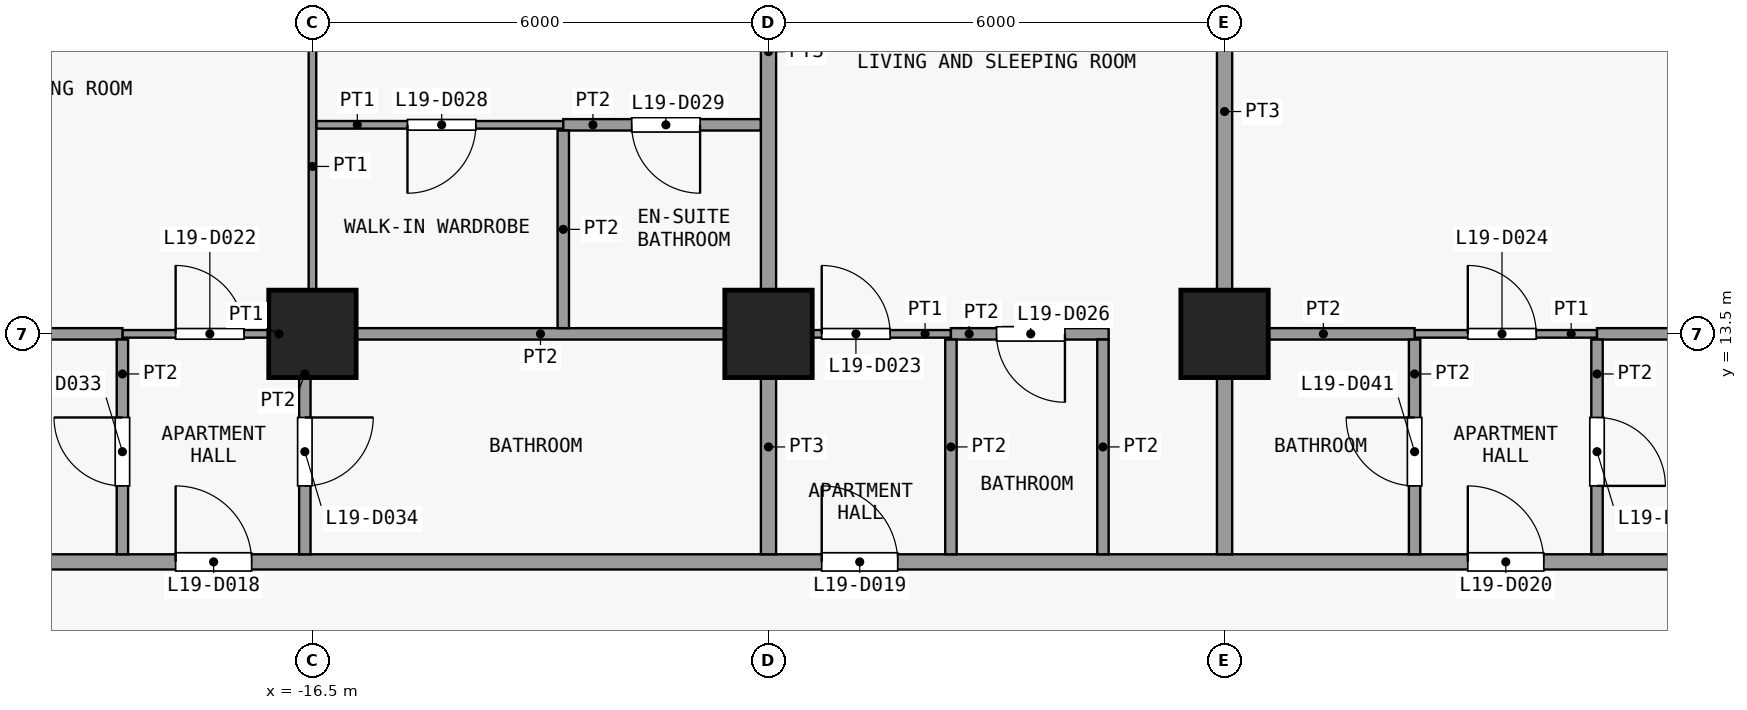
"""IFC4 building model, lengths in metres.
Left out: names, types, materials, properties, quantities, classifications, styles, units other than length and angle.
Written with IfcOpenShell. Run it as: python <this file> out.ifc"""

import sys

from ifc_helpers import new_model, si_unit, direction, frame, frame_2d, origin, origin_2d, place, context, subcontext, project, spatial, rectangle, extrude, element, fill, save


model = new_model("IFC4")
c1 = context("Model", 3, precision=1e-05, world=origin(), true_north=direction((0.0, 1.0)))
c2 = subcontext(c1, "Body", "Model", "MODEL_VIEW")
j1 = project(units=[si_unit("LENGTHUNIT", "METRE"), si_unit("PLANEANGLEUNIT", "RADIAN")], contexts=[c1])
p1 = place(None, origin())
s1 = spatial("IfcSite", under=j1, at=p1, CompositionType="ELEMENT")
p2 = place(p1, origin())
s2 = spatial("IfcBuilding", under=s1, at=p2, CompositionType="ELEMENT")
p3 = place(p2, frame((0.0, 0.0, 81.1)))
s3 = spatial("IfcBuildingStorey", under=s2, at=p3, CompositionType="ELEMENT", Elevation=81.1)
for number, where, z_axis, x_axis in (
    (1, (-16.5, 13.5, 0.0), (0.0, 0.0, 1.0), (1.0, 0.0, 0.0)),
    (2, (-10.5, 13.5, 0.0), (0.0, 0.0, 1.0), (1.0, 0.0, 0.0)),
    (3, (-4.5, 13.5, 0.0), (0.0, 0.0, 1.0), (1.0, 0.0, 0.0)),
):
    element("IfcColumn", number, at=place(p3, frame(where, z_axis=z_axis, x_axis=x_axis)), inside=s3, PredefinedType="COLUMN", context=c2, shape_type="SweptSolid", body=[
        extrude(rectangle(XDim=1.15, YDim=1.15, at=origin_2d()), origin(), (0.0, 0.0, 1.0), 3.6),
    ])
p4 = place(p3, frame((-23.85, 10.5, 0.0), z_axis=(0.0, 0.0, 1.0), x_axis=(1.0, 0.0, 0.0)))
e4 = element("IfcWall", 4, at=p4, inside=s3, PredefinedType="PARTITIONING", context=c2, shape_type="SweptSolid", body=[
    extrude(rectangle(XDim=49.2, YDim=0.2, at=frame_2d((24.6, 0.0))), origin(), (0.0, 0.0, 1.0), 3.3),
])
p5 = place(p4, frame((5.55, 0.0, 0.0)))
e5 = element("IfcOpeningElement", 5, at=p5, cuts=e4, PredefinedType="OPENING", context=c2, shape_type="SweptSolid", body=[
    extrude(rectangle(XDim=1.0, YDim=2.1, at=frame_2d((0.5, 1.05))), frame((0.0, 0.11, 0.0), z_axis=(0.0, -1.0, 0.0), x_axis=(1.0, 0.0, 0.0)), (0.0, 0.0, 1.0), 0.22),
])
p6 = place(p4, frame((14.05, 0.0, 0.0)))
e6 = element("IfcOpeningElement", 6, at=p6, cuts=e4, PredefinedType="OPENING", context=c2, shape_type="SweptSolid", body=[
    extrude(rectangle(XDim=1.0, YDim=2.1, at=frame_2d((0.5, 1.05))), frame((0.0, 0.11, 0.0), z_axis=(0.0, -1.0, 0.0), x_axis=(1.0, 0.0, 0.0)), (0.0, 0.0, 1.0), 0.22),
])
p7 = place(p4, frame((22.55, 0.0, 0.0)))
e7 = element("IfcOpeningElement", 7, at=p7, cuts=e4, PredefinedType="OPENING", context=c2, shape_type="SweptSolid", body=[
    extrude(rectangle(XDim=1.0, YDim=2.1, at=frame_2d((0.5, 1.05))), frame((0.0, 0.11, 0.0), z_axis=(0.0, -1.0, 0.0), x_axis=(1.0, 0.0, 0.0)), (0.0, 0.0, 1.0), 0.22),
])
p8 = place(p4, frame((43.55, 0.0, 0.0)))
e8 = element("IfcOpeningElement", 8, at=p8, cuts=e4, PredefinedType="OPENING", context=c2, shape_type="SweptSolid", body=[
    extrude(rectangle(XDim=1.0, YDim=2.1, at=frame_2d((0.5, 1.05))), frame((0.0, 0.11, 0.0), z_axis=(0.0, -1.0, 0.0), x_axis=(1.0, 0.0, 0.0)), (0.0, 0.0, 1.0), 0.22),
])
p9 = place(p3, frame((-19.0, 13.5, 0.0), z_axis=(0.0, 0.0, 1.0), x_axis=(1.0, 0.0, 0.0)))
e9 = element("IfcWall", 9, at=p9, inside=s3, PredefinedType="PARTITIONING", context=c2, shape_type="SweptSolid", body=[
    extrude(rectangle(XDim=2.4, YDim=0.1, at=frame_2d((1.2, 0.0))), origin(), (0.0, 0.0, 1.0), 3.3),
])
p10 = place(p9, frame((0.7, 0.0, 0.0)))
e10 = element("IfcOpeningElement", 10, at=p10, cuts=e9, PredefinedType="OPENING", context=c2, shape_type="SweptSolid", body=[
    extrude(rectangle(XDim=0.9, YDim=2.1, at=frame_2d((0.45, 1.05))), frame((0.0, 0.06, 0.0), z_axis=(0.0, -1.0, 0.0), x_axis=(1.0, 0.0, 0.0)), (0.0, 0.0, 1.0), 0.12),
])
p11 = place(p3, frame((-10.5, 13.5, 0.0), z_axis=(0.0, 0.0, 1.0), x_axis=(1.0, 0.0, 0.0)))
e11 = element("IfcWall", 11, at=p11, inside=s3, PredefinedType="PARTITIONING", context=c2, shape_type="SweptSolid", body=[
    extrude(rectangle(XDim=2.4, YDim=0.1, at=frame_2d((1.2, 0.0))), origin(), (0.0, 0.0, 1.0), 3.3),
])
p12 = place(p11, frame((0.7, 0.0, 0.0)))
e12 = element("IfcOpeningElement", 12, at=p12, cuts=e11, PredefinedType="OPENING", context=c2, shape_type="SweptSolid", body=[
    extrude(rectangle(XDim=0.9, YDim=2.1, at=frame_2d((0.45, 1.05))), frame((0.0, 0.06, 0.0), z_axis=(0.0, -1.0, 0.0), x_axis=(1.0, 0.0, 0.0)), (0.0, 0.0, 1.0), 0.12),
])
p13 = place(p3, frame((-2.0, 13.5, 0.0), z_axis=(0.0, 0.0, 1.0), x_axis=(1.0, 0.0, 0.0)))
e13 = element("IfcWall", 13, at=p13, inside=s3, PredefinedType="PARTITIONING", context=c2, shape_type="SweptSolid", body=[
    extrude(rectangle(XDim=2.4, YDim=0.1, at=frame_2d((1.2, 0.0))), origin(), (0.0, 0.0, 1.0), 3.3),
])
p14 = place(p13, frame((0.7, 0.0, 0.0)))
e14 = element("IfcOpeningElement", 14, at=p14, cuts=e13, PredefinedType="OPENING", context=c2, shape_type="SweptSolid", body=[
    extrude(rectangle(XDim=0.9, YDim=2.1, at=frame_2d((0.45, 1.05))), frame((0.0, 0.06, 0.0), z_axis=(0.0, -1.0, 0.0), x_axis=(1.0, 0.0, 0.0)), (0.0, 0.0, 1.0), 0.12),
])
p15 = place(p3, frame((-23.85, 13.5, 0.0), z_axis=(0.0, 0.0, 1.0), x_axis=(1.0, 0.0, 0.0)))
e15 = element("IfcWall", 15, at=p15, inside=s3, PredefinedType="PARTITIONING", context=c2, shape_type="SweptSolid", body=[
    extrude(rectangle(XDim=4.85, YDim=0.15, at=frame_2d((2.425, 0.0))), origin(), (0.0, 0.0, 1.0), 3.3),
])
p16 = place(p3, frame((-16.5, 13.5, 0.0), z_axis=(0.0, 0.0, 1.0), x_axis=(1.0, 0.0, 0.0)))
e16 = element("IfcWall", 16, at=p16, inside=s3, PredefinedType="PARTITIONING", context=c2, shape_type="SweptSolid", body=[
    extrude(rectangle(XDim=6.0, YDim=0.15, at=frame_2d((3.0, 0.0))), origin(), (0.0, 0.0, 1.0), 3.3),
])
p17 = place(p3, frame((-8.1, 13.5, 0.0), z_axis=(0.0, 0.0, 1.0), x_axis=(1.0, 0.0, 0.0)))
e17 = element("IfcWall", 17, at=p17, inside=s3, PredefinedType="PARTITIONING", context=c2, shape_type="SweptSolid", body=[
    extrude(rectangle(XDim=2.075, YDim=0.15, at=frame_2d((1.038, 0.0))), origin(), (0.0, 0.0, 1.0), 3.3),
])
p18 = place(p17, frame((0.6, 0.0, 0.0)))
e18 = element("IfcOpeningElement", 18, at=p18, cuts=e17, PredefinedType="OPENING", context=c2, shape_type="SweptSolid", body=[
    extrude(rectangle(XDim=0.9, YDim=2.1, at=frame_2d((0.45, 1.05))), frame((0.0, 0.085, 0.0), z_axis=(0.0, -1.0, 0.0), x_axis=(1.0, 0.0, 0.0)), (0.0, 0.0, 1.0), 0.17),
])
p19 = place(p3, frame((-4.4, 13.5, 0.0), z_axis=(0.0, 0.0, 1.0), x_axis=(1.0, 0.0, 0.0)))
e19 = element("IfcWall", 19, at=p19, inside=s3, PredefinedType="PARTITIONING", context=c2, shape_type="SweptSolid", body=[
    extrude(rectangle(XDim=2.4, YDim=0.15, at=frame_2d((1.2, 0.0))), origin(), (0.0, 0.0, 1.0), 3.3),
])
p20 = place(p3, frame((0.4, 13.5, 0.0), z_axis=(0.0, 0.0, 1.0), x_axis=(1.0, 0.0, 0.0)))
e20 = element("IfcWall", 20, at=p20, inside=s3, PredefinedType="PARTITIONING", context=c2, shape_type="SweptSolid", body=[
    extrude(rectangle(XDim=10.1, YDim=0.15, at=frame_2d((5.05, 0.0))), origin(), (0.0, 0.0, 1.0), 3.3),
])
p21 = place(p3, frame((-16.45, 16.25, 0.0), z_axis=(0.0, 0.0, 1.0), x_axis=(1.0, 0.0, 0.0)))
e21 = element("IfcWall", 21, at=p21, inside=s3, PredefinedType="PARTITIONING", context=c2, shape_type="SweptSolid", body=[
    extrude(rectangle(XDim=3.25, YDim=0.1, at=frame_2d((1.625, 0.0))), origin(), (0.0, 0.0, 1.0), 3.3),
])
p22 = place(p21, frame((1.2, 0.0, 0.0)))
e22 = element("IfcOpeningElement", 22, at=p22, cuts=e21, PredefinedType="OPENING", context=c2, shape_type="SweptSolid", body=[
    extrude(rectangle(XDim=0.9, YDim=2.1, at=frame_2d((0.45, 1.05))), frame((0.0, 0.06, 0.0), z_axis=(0.0, -1.0, 0.0), x_axis=(1.0, 0.0, 0.0)), (0.0, 0.0, 1.0), 0.12),
])
p23 = place(p3, frame((-13.2, 16.25, 0.0), z_axis=(0.0, 0.0, 1.0), x_axis=(1.0, 0.0, 0.0)))
e23 = element("IfcWall", 23, at=p23, inside=s3, PredefinedType="PARTITIONING", context=c2, shape_type="SweptSolid", body=[
    extrude(rectangle(XDim=2.6, YDim=0.15, at=frame_2d((1.3, 0.0))), origin(), (0.0, 0.0, 1.0), 3.3),
])
p24 = place(p23, frame((0.9, 0.0, 0.0)))
e24 = element("IfcOpeningElement", 24, at=p24, cuts=e23, PredefinedType="OPENING", context=c2, shape_type="SweptSolid", body=[
    extrude(rectangle(XDim=0.9, YDim=2.1, at=frame_2d((0.45, 1.05))), frame((0.0, 0.085, 0.0), z_axis=(0.0, -1.0, 0.0), x_axis=(1.0, 0.0, 0.0)), (0.0, 0.0, 1.0), 0.17),
])
p25 = place(p3, frame((-19.0, 10.6, 0.0), z_axis=(0.0, 0.0, 1.0), x_axis=(0.0, 1.0, 0.0)))
e25 = element("IfcWall", 25, at=p25, inside=s3, PredefinedType="PARTITIONING", context=c2, shape_type="SweptSolid", body=[
    extrude(rectangle(XDim=2.825, YDim=0.15, at=frame_2d((1.413, 0.0))), origin(), (0.0, 0.0, 1.0), 3.3),
])
p26 = place(p25, frame((0.9, 0.0, 0.0)))
e26 = element("IfcOpeningElement", 26, at=p26, cuts=e25, PredefinedType="OPENING", context=c2, shape_type="SweptSolid", body=[
    extrude(rectangle(XDim=0.9, YDim=2.1, at=frame_2d((0.45, 1.05))), frame((0.0, 0.085, 0.0), z_axis=(0.0, -1.0, 0.0), x_axis=(1.0, 0.0, 0.0)), (0.0, 0.0, 1.0), 0.17),
])
p27 = place(p3, frame((-16.6, 10.6, 0.0), z_axis=(0.0, 0.0, 1.0), x_axis=(0.0, 1.0, 0.0)))
e27 = element("IfcWall", 27, at=p27, inside=s3, PredefinedType="PARTITIONING", context=c2, shape_type="SweptSolid", body=[
    extrude(rectangle(XDim=2.825, YDim=0.15, at=frame_2d((1.413, 0.0))), origin(), (0.0, 0.0, 1.0), 3.3),
])
p28 = place(p27, frame((0.9, 0.0, 0.0)))
e28 = element("IfcOpeningElement", 28, at=p28, cuts=e27, PredefinedType="OPENING", context=c2, shape_type="SweptSolid", body=[
    extrude(rectangle(XDim=0.9, YDim=2.1, at=frame_2d((0.45, 1.05))), frame((0.0, 0.085, 0.0), z_axis=(0.0, -1.0, 0.0), x_axis=(1.0, 0.0, 0.0)), (0.0, 0.0, 1.0), 0.17),
])
p29 = place(p3, frame((-16.5, 13.575, 0.0), z_axis=(0.0, 0.0, 1.0), x_axis=(0.0, 1.0, 0.0)))
e29 = element("IfcWall", 29, at=p29, inside=s3, PredefinedType="PARTITIONING", context=c2, shape_type="SweptSolid", body=[
    extrude(rectangle(XDim=7.275, YDim=0.1, at=frame_2d((3.638, 0.0))), origin(), (0.0, 0.0, 1.0), 3.3),
])
p30 = place(p29, frame((4.375, 0.0, 0.0)))
e30 = element("IfcOpeningElement", 30, at=p30, cuts=e29, PredefinedType="OPENING", context=c2, shape_type="SweptSolid", body=[
    extrude(rectangle(XDim=0.9, YDim=2.1, at=frame_2d((0.45, 1.05))), frame((0.0, 0.06, 0.0), z_axis=(0.0, -1.0, 0.0), x_axis=(1.0, 0.0, 0.0)), (0.0, 0.0, 1.0), 0.12),
])
p31 = place(p3, frame((-13.2, 13.575, 0.0), z_axis=(0.0, 0.0, 1.0), x_axis=(0.0, 1.0, 0.0)))
e31 = element("IfcWall", 31, at=p31, inside=s3, PredefinedType="PARTITIONING", context=c2, shape_type="SweptSolid", body=[
    extrude(rectangle(XDim=2.6, YDim=0.15, at=frame_2d((1.3, 0.0))), origin(), (0.0, 0.0, 1.0), 3.3),
])
p32 = place(p3, frame((-10.5, 10.6, 0.0), z_axis=(0.0, 0.0, 1.0), x_axis=(0.0, 1.0, 0.0)))
e32 = element("IfcWall", 32, at=p32, inside=s3, PredefinedType="PARTITIONING", context=c2, shape_type="SweptSolid", body=[
    extrude(rectangle(XDim=2.825, YDim=0.2, at=frame_2d((1.413, 0.0))), origin(), (0.0, 0.0, 1.0), 3.3),
])
p33 = place(p3, frame((-10.5, 13.575, 0.0), z_axis=(0.0, 0.0, 1.0), x_axis=(0.0, 1.0, 0.0)))
e33 = element("IfcWall", 33, at=p33, inside=s3, PredefinedType="PARTITIONING", context=c2, shape_type="SweptSolid", body=[
    extrude(rectangle(XDim=7.275, YDim=0.2, at=frame_2d((3.638, 0.0))), origin(), (0.0, 0.0, 1.0), 3.3),
])
for number, where, z_axis, x_axis in (
    (34, (-8.1, 10.6, 0.0), (0.0, 0.0, 1.0), (0.0, 1.0, 0.0)),
    (35, (-6.1, 10.6, 0.0), (0.0, 0.0, 1.0), (0.0, 1.0, 0.0)),
):
    element("IfcWall", number, at=place(p3, frame(where, z_axis=z_axis, x_axis=x_axis)), inside=s3, PredefinedType="PARTITIONING", context=c2, shape_type="SweptSolid", body=[
        extrude(rectangle(XDim=2.825, YDim=0.15, at=frame_2d((1.413, 0.0))), origin(), (0.0, 0.0, 1.0), 3.3),
    ])
p34 = place(p3, frame((-4.5, 10.6, 0.0), z_axis=(0.0, 0.0, 1.0), x_axis=(0.0, 1.0, 0.0)))
e36 = element("IfcWall", 36, at=p34, inside=s3, PredefinedType="PARTITIONING", context=c2, shape_type="SweptSolid", body=[
    extrude(rectangle(XDim=11.65, YDim=0.2, at=frame_2d((5.825, 0.0))), origin(), (0.0, 0.0, 1.0), 3.3),
])
p35 = place(p3, frame((-2.0, 10.6, 0.0), z_axis=(0.0, 0.0, 1.0), x_axis=(0.0, 1.0, 0.0)))
e37 = element("IfcWall", 37, at=p35, inside=s3, PredefinedType="PARTITIONING", context=c2, shape_type="SweptSolid", body=[
    extrude(rectangle(XDim=2.825, YDim=0.15, at=frame_2d((1.413, 0.0))), origin(), (0.0, 0.0, 1.0), 3.3),
])
p36 = place(p35, frame((0.9, 0.0, 0.0)))
e38 = element("IfcOpeningElement", 38, at=p36, cuts=e37, PredefinedType="OPENING", context=c2, shape_type="SweptSolid", body=[
    extrude(rectangle(XDim=0.9, YDim=2.1, at=frame_2d((0.45, 1.05))), frame((0.0, 0.085, 0.0), z_axis=(0.0, -1.0, 0.0), x_axis=(1.0, 0.0, 0.0)), (0.0, 0.0, 1.0), 0.17),
])
p37 = place(p3, frame((0.4, 10.6, 0.0), z_axis=(0.0, 0.0, 1.0), x_axis=(0.0, 1.0, 0.0)))
e39 = element("IfcWall", 39, at=p37, inside=s3, PredefinedType="PARTITIONING", context=c2, shape_type="SweptSolid", body=[
    extrude(rectangle(XDim=2.825, YDim=0.15, at=frame_2d((1.413, 0.0))), origin(), (0.0, 0.0, 1.0), 3.3),
])
p38 = place(p37, frame((0.9, 0.0, 0.0)))
e40 = element("IfcOpeningElement", 40, at=p38, cuts=e39, PredefinedType="OPENING", context=c2, shape_type="SweptSolid", body=[
    extrude(rectangle(XDim=0.9, YDim=2.1, at=frame_2d((0.45, 1.05))), frame((0.0, 0.085, 0.0), z_axis=(0.0, -1.0, 0.0), x_axis=(1.0, 0.0, 0.0)), (0.0, 0.0, 1.0), 0.17),
])
p39 = place(p5, origin())
e41 = element("IfcDoor", 41, at=p39, inside=s3, OperationType="SINGLE_SWING_RIGHT", PredefinedType="DOOR", context=c2, shape_type="SweptSolid", body=[
    extrude(rectangle(XDim=1.0, YDim=2.1, at=frame_2d((0.5, 1.05))), frame((0.0, 0.025, 0.0), z_axis=(0.0, -1.0, 0.0), x_axis=(1.0, 0.0, 0.0)), (0.0, 0.0, 1.0), 0.05),
])
fill(e5, e41)
p40 = place(p6, origin())
e42 = element("IfcDoor", 42, at=p40, inside=s3, OperationType="SINGLE_SWING_RIGHT", PredefinedType="DOOR", context=c2, shape_type="SweptSolid", body=[
    extrude(rectangle(XDim=1.0, YDim=2.1, at=frame_2d((0.5, 1.05))), frame((0.0, 0.025, 0.0), z_axis=(0.0, -1.0, 0.0), x_axis=(1.0, 0.0, 0.0)), (0.0, 0.0, 1.0), 0.05),
])
fill(e6, e42)
p41 = place(p7, origin())
e43 = element("IfcDoor", 43, at=p41, inside=s3, OperationType="SINGLE_SWING_RIGHT", PredefinedType="DOOR", context=c2, shape_type="SweptSolid", body=[
    extrude(rectangle(XDim=1.0, YDim=2.1, at=frame_2d((0.5, 1.05))), frame((0.0, 0.025, 0.0), z_axis=(0.0, -1.0, 0.0), x_axis=(1.0, 0.0, 0.0)), (0.0, 0.0, 1.0), 0.05),
])
fill(e7, e43)
p42 = place(p10, origin())
e44 = element("IfcDoor", 44, at=p42, inside=s3, OperationType="SINGLE_SWING_RIGHT", PredefinedType="DOOR", context=c2, shape_type="SweptSolid", body=[
    extrude(rectangle(XDim=0.9, YDim=2.1, at=frame_2d((0.45, 1.05))), frame((0.0, 0.025, 0.0), z_axis=(0.0, -1.0, 0.0), x_axis=(1.0, 0.0, 0.0)), (0.0, 0.0, 1.0), 0.05),
])
fill(e10, e44)
p43 = place(p12, origin())
e45 = element("IfcDoor", 45, at=p43, inside=s3, OperationType="SINGLE_SWING_RIGHT", PredefinedType="DOOR", context=c2, shape_type="SweptSolid", body=[
    extrude(rectangle(XDim=0.9, YDim=2.1, at=frame_2d((0.45, 1.05))), frame((0.0, 0.025, 0.0), z_axis=(0.0, -1.0, 0.0), x_axis=(1.0, 0.0, 0.0)), (0.0, 0.0, 1.0), 0.05),
])
fill(e12, e45)
p44 = place(p14, origin())
e46 = element("IfcDoor", 46, at=p44, inside=s3, OperationType="SINGLE_SWING_RIGHT", PredefinedType="DOOR", context=c2, shape_type="SweptSolid", body=[
    extrude(rectangle(XDim=0.9, YDim=2.1, at=frame_2d((0.45, 1.05))), frame((0.0, 0.025, 0.0), z_axis=(0.0, -1.0, 0.0), x_axis=(1.0, 0.0, 0.0)), (0.0, 0.0, 1.0), 0.05),
])
fill(e14, e46)
p45 = place(p18, origin())
e47 = element("IfcDoor", 47, at=p45, inside=s3, OperationType="SINGLE_SWING_RIGHT", PredefinedType="DOOR", context=c2, shape_type="SweptSolid", body=[
    extrude(rectangle(XDim=0.9, YDim=2.1, at=frame_2d((0.45, 1.05))), frame((0.0, 0.025, 0.0), z_axis=(0.0, -1.0, 0.0), x_axis=(1.0, 0.0, 0.0)), (0.0, 0.0, 1.0), 0.05),
])
fill(e18, e47)
p46 = place(p22, origin())
e48 = element("IfcDoor", 48, at=p46, inside=s3, OperationType="SINGLE_SWING_LEFT", PredefinedType="DOOR", context=c2, shape_type="SweptSolid", body=[
    extrude(rectangle(XDim=0.9, YDim=2.1, at=frame_2d((0.45, 1.05))), frame((0.0, 0.025, 0.0), z_axis=(0.0, -1.0, 0.0), x_axis=(1.0, 0.0, 0.0)), (0.0, 0.0, 1.0), 0.05),
])
fill(e22, e48)
p47 = place(p24, origin())
e49 = element("IfcDoor", 49, at=p47, inside=s3, OperationType="SINGLE_SWING_RIGHT", PredefinedType="DOOR", context=c2, shape_type="SweptSolid", body=[
    extrude(rectangle(XDim=0.9, YDim=2.1, at=frame_2d((0.45, 1.05))), frame((0.0, 0.025, 0.0), z_axis=(0.0, -1.0, 0.0), x_axis=(1.0, 0.0, 0.0)), (0.0, 0.0, 1.0), 0.05),
])
fill(e24, e49)
p48 = place(p26, origin())
e50 = element("IfcDoor", 50, at=p48, inside=s3, OperationType="SINGLE_SWING_LEFT", PredefinedType="DOOR", context=c2, shape_type="SweptSolid", body=[
    extrude(rectangle(XDim=0.9, YDim=2.1, at=frame_2d((0.45, 1.05))), frame((0.0, 0.025, 0.0), z_axis=(0.0, -1.0, 0.0), x_axis=(1.0, 0.0, 0.0)), (0.0, 0.0, 1.0), 0.05),
])
fill(e26, e50)
p49 = place(p28, origin())
e51 = element("IfcDoor", 51, at=p49, inside=s3, OperationType="SINGLE_SWING_RIGHT", PredefinedType="DOOR", context=c2, shape_type="SweptSolid", body=[
    extrude(rectangle(XDim=0.9, YDim=2.1, at=frame_2d((0.45, 1.05))), frame((0.0, 0.025, 0.0), z_axis=(0.0, -1.0, 0.0), x_axis=(1.0, 0.0, 0.0)), (0.0, 0.0, 1.0), 0.05),
])
fill(e28, e51)
p50 = place(p36, origin())
e52 = element("IfcDoor", 52, at=p50, inside=s3, OperationType="SINGLE_SWING_LEFT", PredefinedType="DOOR", context=c2, shape_type="SweptSolid", body=[
    extrude(rectangle(XDim=0.9, YDim=2.1, at=frame_2d((0.45, 1.05))), frame((0.0, 0.025, 0.0), z_axis=(0.0, -1.0, 0.0), x_axis=(1.0, 0.0, 0.0)), (0.0, 0.0, 1.0), 0.05),
])
fill(e38, e52)
p51 = place(p38, origin())
e53 = element("IfcDoor", 53, at=p51, inside=s3, OperationType="SINGLE_SWING_LEFT", PredefinedType="DOOR", context=c2, shape_type="SweptSolid", body=[
    extrude(rectangle(XDim=0.9, YDim=2.1, at=frame_2d((0.45, 1.05))), frame((0.0, 0.025, 0.0), z_axis=(0.0, -1.0, 0.0), x_axis=(1.0, 0.0, 0.0)), (0.0, 0.0, 1.0), 0.05),
])
fill(e40, e53)
save(model, sys.argv[1])
